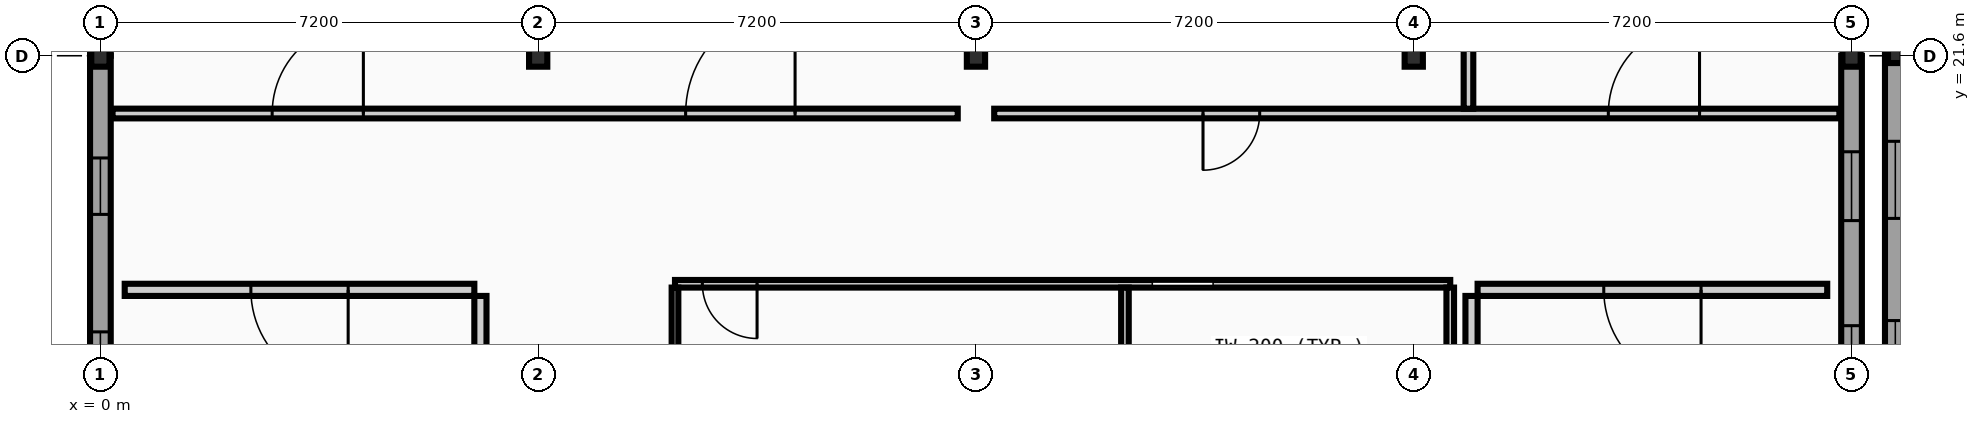
"""IFC4 building model, lengths in metres.
Left out: names, types, materials, properties, quantities, classifications, styles, units other than length and angle.
Written with IfcOpenShell. Run it as: python <this file> out.ifc"""

import sys

from ifc_helpers import new_model, si_unit, direction, frame, frame_2d, origin, origin_2d, place, context, subcontext, project, spatial, rectangle, i_section, extrude, element, fill, save


model = new_model("IFC4")
c1 = context("Model", 3, precision=1e-05, world=origin(), true_north=direction((0.0, 1.0)))
c2 = subcontext(c1, "Body", "Model", "MODEL_VIEW")
j1 = project(units=[si_unit("LENGTHUNIT", "METRE"), si_unit("PLANEANGLEUNIT", "RADIAN")], contexts=[c1])
p1 = place(None, origin())
s1 = spatial("IfcSite", under=j1, at=p1, CompositionType="ELEMENT")
p2 = place(p1, origin())
s2 = spatial("IfcBuilding", under=s1, at=p2, CompositionType="ELEMENT")
p3 = place(p2, frame((0.0, 0.0, 18.4)))
s3 = spatial("IfcBuildingStorey", under=s2, at=p3, CompositionType="ELEMENT", Elevation=18.4)
for number, where, z_axis, x_axis in (
    (1, (0.0, 21.6, 0.0), (0.0, 0.0, 1.0), (1.0, 0.0, 0.0)),
    (2, (7.2, 21.6, 0.0), (0.0, 0.0, 1.0), (1.0, 0.0, 0.0)),
    (3, (14.4, 21.6, 0.0), (0.0, 0.0, 1.0), (1.0, 0.0, 0.0)),
    (4, (21.6, 21.6, 0.0), (0.0, 0.0, 1.0), (1.0, 0.0, 0.0)),
    (5, (28.8, 21.6, 0.0), (0.0, 0.0, 1.0), (1.0, 0.0, 0.0)),
):
    element("IfcColumn", number, at=place(p3, frame(where, z_axis=z_axis, x_axis=x_axis)), inside=s3, PredefinedType="COLUMN", context=c2, shape_type="SweptSolid", body=[
        extrude(i_section(OverallWidth=0.3, OverallDepth=0.36, WebThickness=0.012, FlangeThickness=0.022, FilletRadius=0.027, at=origin_2d()), origin(), (0.0, 0.0, 1.0), 4.4),
    ])
p4 = place(p3, frame((29.52, 21.6, 0.0), z_axis=(0.0, 0.0, 1.0), x_axis=(1.0, 0.0, 0.0)))
e6 = element("IfcColumn", 6, at=p4, inside=s3, PredefinedType="COLUMN", context=c2, shape_type="SweptSolid", body=[
    extrude(i_section(OverallWidth=0.24, OverallDepth=0.24, WebThickness=0.01, FlangeThickness=0.017, FilletRadius=0.021, at=origin_2d()), origin(), (0.0, 0.0, 1.0), 4.4),
])
p5 = place(p3, frame((0.0, 21.6, 0.0), z_axis=(0.0, 0.0, 1.0), x_axis=(0.0, -1.0, 0.0)))
e7 = element("IfcWall", 7, at=p5, inside=s3, PredefinedType="STANDARD", context=c2, shape_type="SweptSolid", body=[
    extrude(rectangle(XDim=7.15, YDim=0.34, at=frame_2d((3.575, 0.0))), origin(), (0.0, 0.0, 1.0), 4.215),
])
p6 = place(p5, frame((1.681, 0.0, 0.95)))
e8 = element("IfcOpeningElement", 8, at=p6, cuts=e7, PredefinedType="OPENING", context=c2, shape_type="SweptSolid", body=[
    extrude(rectangle(XDim=0.928, YDim=1.404, at=frame_2d((0.464, 0.702))), frame((0.0, 0.18, 0.0), z_axis=(0.0, -1.0, 0.0), x_axis=(1.0, 0.0, 0.0)), (0.0, 0.0, 1.0), 0.36),
])
p7 = place(p5, frame((4.541, 0.0, 0.95)))
e9 = element("IfcOpeningElement", 9, at=p7, cuts=e7, PredefinedType="OPENING", context=c2, shape_type="SweptSolid", body=[
    extrude(rectangle(XDim=0.928, YDim=1.404, at=frame_2d((0.464, 0.702))), frame((0.0, 0.18, 0.0), z_axis=(0.0, -1.0, 0.0), x_axis=(1.0, 0.0, 0.0)), (0.0, 0.0, 1.0), 0.36),
])
p8 = place(p3, frame((0.0, 28.8, 0.0), z_axis=(0.0, 0.0, 1.0), x_axis=(0.0, -1.0, 0.0)))
e10 = element("IfcWall", 10, at=p8, inside=s3, PredefinedType="STANDARD", context=c2, shape_type="SweptSolid", body=[
    extrude(rectangle(XDim=7.2, YDim=0.34, at=frame_2d((3.6, 0.0))), origin(), (0.0, 0.0, 1.0), 3.9),
])
p9 = place(p8, frame((1.679, 0.0, 0.95)))
e11 = element("IfcOpeningElement", 11, at=p9, cuts=e10, PredefinedType="OPENING", context=c2, shape_type="SweptSolid", body=[
    extrude(rectangle(XDim=0.962, YDim=1.404, at=frame_2d((0.481, 0.702))), frame((0.0, 0.18, 0.0), z_axis=(0.0, -1.0, 0.0), x_axis=(1.0, 0.0, 0.0)), (0.0, 0.0, 1.0), 0.36),
])
p10 = place(p8, frame((4.559, 0.0, 0.95)))
e12 = element("IfcOpeningElement", 12, at=p10, cuts=e10, PredefinedType="OPENING", context=c2, shape_type="SweptSolid", body=[
    extrude(rectangle(XDim=0.962, YDim=1.404, at=frame_2d((0.481, 0.702))), frame((0.0, 0.18, 0.0), z_axis=(0.0, -1.0, 0.0), x_axis=(1.0, 0.0, 0.0)), (0.0, 0.0, 1.0), 0.36),
])
p11 = place(p3, frame((28.8, 14.45, 0.0), z_axis=(0.0, 0.0, 1.0), x_axis=(0.0, 1.0, 0.0)))
e13 = element("IfcWall", 13, at=p11, inside=s3, PredefinedType="STANDARD", context=c2, shape_type="SweptSolid", body=[
    extrude(rectangle(XDim=7.15, YDim=0.34, at=frame_2d((3.575, 0.0))), origin(), (0.0, 0.0, 1.0), 4.215),
])
p12 = place(p11, frame((1.579, 0.0, 0.95)))
e14 = element("IfcOpeningElement", 14, at=p12, cuts=e13, PredefinedType="OPENING", context=c2, shape_type="SweptSolid", body=[
    extrude(rectangle(XDim=1.132, YDim=1.404, at=frame_2d((0.566, 0.702))), frame((0.0, 0.18, 0.0), z_axis=(0.0, -1.0, 0.0), x_axis=(1.0, 0.0, 0.0)), (0.0, 0.0, 1.0), 0.36),
])
p13 = place(p11, frame((4.439, 0.0, 0.95)))
e15 = element("IfcOpeningElement", 15, at=p13, cuts=e13, PredefinedType="OPENING", context=c2, shape_type="SweptSolid", body=[
    extrude(rectangle(XDim=1.132, YDim=1.404, at=frame_2d((0.566, 0.702))), frame((0.0, 0.18, 0.0), z_axis=(0.0, -1.0, 0.0), x_axis=(1.0, 0.0, 0.0)), (0.0, 0.0, 1.0), 0.36),
])
p14 = place(p3, frame((29.52, 21.77, 0.0), z_axis=(0.0, 0.0, 1.0), x_axis=(0.0, -1.0, 0.0)))
e16 = element("IfcWall", 16, at=p14, inside=s3, PredefinedType="STANDARD", context=c2, shape_type="SweptSolid", body=[
    extrude(rectangle(XDim=7.37, YDim=0.34, at=frame_2d((3.685, 0.0))), origin(), (0.0, 0.0, 1.0), 4.11),
])
p15 = place(p14, frame((1.577, 0.0, 0.95)))
e17 = element("IfcOpeningElement", 17, at=p15, cuts=e16, PredefinedType="OPENING", context=c2, shape_type="SweptSolid", body=[
    extrude(rectangle(XDim=1.268, YDim=1.404, at=frame_2d((0.634, 0.702))), frame((0.0, 0.18, 0.0), z_axis=(0.0, -1.0, 0.0), x_axis=(1.0, 0.0, 0.0)), (0.0, 0.0, 1.0), 0.36),
])
p16 = place(p14, frame((4.525, 0.0, 0.95)))
e18 = element("IfcOpeningElement", 18, at=p16, cuts=e16, PredefinedType="OPENING", context=c2, shape_type="SweptSolid", body=[
    extrude(rectangle(XDim=1.268, YDim=1.404, at=frame_2d((0.634, 0.702))), frame((0.0, 0.18, 0.0), z_axis=(0.0, -1.0, 0.0), x_axis=(1.0, 0.0, 0.0)), (0.0, 0.0, 1.0), 0.36),
])
p17 = place(p3, frame((0.4, 17.75, 0.0), z_axis=(0.0, 0.0, 1.0), x_axis=(1.0, 0.0, 0.0)))
e19 = element("IfcWall", 19, at=p17, inside=s3, PredefinedType="PARTITIONING", context=c2, shape_type="SweptSolid", body=[
    extrude(rectangle(XDim=5.75, YDim=0.2, at=frame_2d((2.875, 0.0))), origin(), (0.0, 0.0, 1.0), 4.215),
])
p18 = place(p17, frame((2.075, 0.0, 0.0)))
e20 = element("IfcOpeningElement", 20, at=p18, cuts=e19, PredefinedType="OPENING", context=c2, shape_type="SweptSolid", body=[
    extrude(rectangle(XDim=1.6, YDim=2.2, at=frame_2d((0.8, 1.1))), frame((0.0, 0.11, 0.0), z_axis=(0.0, -1.0, 0.0), x_axis=(1.0, 0.0, 0.0)), (0.0, 0.0, 1.0), 0.22),
])
p19 = place(p3, frame((6.25, 14.45, 0.0), z_axis=(0.0, 0.0, 1.0), x_axis=(0.0, 1.0, 0.0)))
e21 = element("IfcWall", 21, at=p19, inside=s3, PredefinedType="PARTITIONING", context=c2, shape_type="SweptSolid", body=[
    extrude(rectangle(XDim=3.2, YDim=0.2, at=frame_2d((1.6, 0.0))), origin(), (0.0, 0.0, 1.0), 4.215),
])
p20 = place(p3, frame((22.65, 17.75, 0.0), z_axis=(0.0, 0.0, 1.0), x_axis=(1.0, 0.0, 0.0)))
e22 = element("IfcWall", 22, at=p20, inside=s3, PredefinedType="PARTITIONING", context=c2, shape_type="SweptSolid", body=[
    extrude(rectangle(XDim=5.75, YDim=0.2, at=frame_2d((2.875, 0.0))), origin(), (0.0, 0.0, 1.0), 4.215),
])
p21 = place(p20, frame((2.075, 0.0, 0.0)))
e23 = element("IfcOpeningElement", 23, at=p21, cuts=e22, PredefinedType="OPENING", context=c2, shape_type="SweptSolid", body=[
    extrude(rectangle(XDim=1.6, YDim=2.2, at=frame_2d((0.8, 1.1))), frame((0.0, 0.11, 0.0), z_axis=(0.0, -1.0, 0.0), x_axis=(1.0, 0.0, 0.0)), (0.0, 0.0, 1.0), 0.22),
])
p22 = place(p3, frame((22.55, 14.45, 0.0), z_axis=(0.0, 0.0, 1.0), x_axis=(0.0, 1.0, 0.0)))
e24 = element("IfcWall", 24, at=p22, inside=s3, PredefinedType="PARTITIONING", context=c2, shape_type="SweptSolid", body=[
    extrude(rectangle(XDim=3.2, YDim=0.2, at=frame_2d((1.6, 0.0))), origin(), (0.0, 0.0, 1.0), 4.215),
])
p23 = place(p3, frame((9.45, 17.85, 0.0), z_axis=(0.0, 0.0, 1.0), x_axis=(1.0, 0.0, 0.0)))
e25 = element("IfcWall", 25, at=p23, inside=s3, PredefinedType="PARTITIONING", context=c2, shape_type="SweptSolid", body=[
    extrude(rectangle(XDim=12.75, YDim=0.125, at=frame_2d((6.375, 0.0))), origin(), (0.0, 0.0, 1.0), 4.215),
])
p24 = place(p23, frame((7.85, 0.0, 0.0)))
e26 = element("IfcOpeningElement", 26, at=p24, cuts=e25, PredefinedType="OPENING", context=c2, shape_type="SweptSolid", body=[
    extrude(rectangle(XDim=1.0, YDim=2.1, at=frame_2d((0.5, 1.05))), frame((0.0, 0.073, 0.0), z_axis=(0.0, -1.0, 0.0), x_axis=(1.0, 0.0, 0.0)), (0.0, 0.0, 1.0), 0.145),
])
p25 = place(p23, frame((0.45, 0.0, 0.0)))
e27 = element("IfcOpeningElement", 27, at=p25, cuts=e25, PredefinedType="OPENING", context=c2, shape_type="SweptSolid", body=[
    extrude(rectangle(XDim=0.9, YDim=2.1, at=frame_2d((0.45, 1.05))), frame((0.0, 0.073, 0.0), z_axis=(0.0, -1.0, 0.0), x_axis=(1.0, 0.0, 0.0)), (0.0, 0.0, 1.0), 0.145),
])
p26 = place(p3, frame((0.2, 20.65, 0.0), z_axis=(0.0, 0.0, 1.0), x_axis=(1.0, 0.0, 0.0)))
e28 = element("IfcWall", 28, at=p26, inside=s3, PredefinedType="PARTITIONING", context=c2, shape_type="SweptSolid", body=[
    extrude(rectangle(XDim=13.9, YDim=0.16, at=frame_2d((6.95, 0.0))), origin(), (0.0, 0.0, 1.0), 4.215),
])
p27 = place(p26, frame((2.625, 0.0, 0.0)))
e29 = element("IfcOpeningElement", 29, at=p27, cuts=e28, PredefinedType="OPENING", context=c2, shape_type="SweptSolid", body=[
    extrude(rectangle(XDim=1.5, YDim=2.2, at=frame_2d((0.75, 1.1))), frame((0.0, 0.09, 0.0), z_axis=(0.0, -1.0, 0.0), x_axis=(1.0, 0.0, 0.0)), (0.0, 0.0, 1.0), 0.18),
])
p28 = place(p26, frame((9.425, 0.0, 0.0)))
e30 = element("IfcOpeningElement", 30, at=p28, cuts=e28, PredefinedType="OPENING", context=c2, shape_type="SweptSolid", body=[
    extrude(rectangle(XDim=1.8, YDim=2.3, at=frame_2d((0.9, 1.15))), frame((0.0, 0.09, 0.0), z_axis=(0.0, -1.0, 0.0), x_axis=(1.0, 0.0, 0.0)), (0.0, 0.0, 1.0), 0.18),
])
p29 = place(p3, frame((14.7, 20.65, 0.0), z_axis=(0.0, 0.0, 1.0), x_axis=(1.0, 0.0, 0.0)))
e31 = element("IfcWall", 31, at=p29, inside=s3, PredefinedType="PARTITIONING", context=c2, shape_type="SweptSolid", body=[
    extrude(rectangle(XDim=13.9, YDim=0.158, at=frame_2d((6.95, 0.0))), origin(), (0.0, 0.0, 1.0), 4.215),
])
p30 = place(p29, frame((10.1, 0.0, 0.0)))
e32 = element("IfcOpeningElement", 32, at=p30, cuts=e31, PredefinedType="OPENING", context=c2, shape_type="SweptSolid", body=[
    extrude(rectangle(XDim=1.5, YDim=2.2, at=frame_2d((0.75, 1.1))), frame((0.0, 0.089, 0.0), z_axis=(0.0, -1.0, 0.0), x_axis=(1.0, 0.0, 0.0)), (0.0, 0.0, 1.0), 0.178),
])
p31 = place(p29, frame((3.434, 0.0, 0.0)))
e33 = element("IfcOpeningElement", 33, at=p31, cuts=e31, PredefinedType="OPENING", context=c2, shape_type="SweptSolid", body=[
    extrude(rectangle(XDim=0.932, YDim=2.068, at=frame_2d((0.466, 1.034))), frame((0.0, 0.089, 0.0), z_axis=(0.0, -1.0, 0.0), x_axis=(1.0, 0.0, 0.0)), (0.0, 0.0, 1.0), 0.178),
])
p32 = place(p3, frame((9.45, 3.36, 0.0), z_axis=(0.0, 0.0, 1.0), x_axis=(0.0, 1.0, 0.0)))
e34 = element("IfcWall", 34, at=p32, inside=s3, PredefinedType="PARTITIONING", context=c2, shape_type="SweptSolid", body=[
    extrude(rectangle(XDim=14.427, YDim=0.11, at=frame_2d((7.214, 0.0))), origin(), (0.0, 0.0, 1.0), 3.96),
])
p33 = place(p3, frame((16.85, 0.2, 0.0), z_axis=(0.0, 0.0, 1.0), x_axis=(0.0, 1.0, 0.0)))
e35 = element("IfcWall", 35, at=p33, inside=s3, PredefinedType="PARTITIONING", context=c2, shape_type="SweptSolid", body=[
    extrude(rectangle(XDim=17.588, YDim=0.125, at=frame_2d((8.794, 0.0))), origin(), (0.0, 0.0, 1.0), 3.96),
])
p34 = place(p3, frame((22.2, 14.65, 0.0), z_axis=(0.0, 0.0, 1.0), x_axis=(0.0, 1.0, 0.0)))
e36 = element("IfcWall", 36, at=p34, inside=s3, PredefinedType="PARTITIONING", context=c2, shape_type="SweptSolid", body=[
    extrude(rectangle(XDim=3.138, YDim=0.125, at=frame_2d((1.569, 0.0))), origin(), (0.0, 0.0, 1.0), 4.215),
])
p35 = place(p3, frame((22.5, 20.729, 0.0), z_axis=(0.0, 0.0, 1.0), x_axis=(0.0, 1.0, 0.0)))
e37 = element("IfcWall", 37, at=p35, inside=s3, PredefinedType="PARTITIONING", context=c2, shape_type="SweptSolid", body=[
    extrude(rectangle(XDim=29.471, YDim=0.158, at=frame_2d((14.735, 0.0))), origin(), (0.0, 0.0, 1.0), 4.215),
])
p36 = place(p6, origin())
e38 = element("IfcWindow", 38, at=p36, inside=s3, PartitioningType="SINGLE_PANEL", PredefinedType="WINDOW", context=c2, shape_type="SweptSolid", body=[
    extrude(rectangle(XDim=0.928, YDim=1.404, at=frame_2d((0.464, 0.702))), frame((0.0, 0.03, 0.0), z_axis=(0.0, -1.0, 0.0), x_axis=(1.0, 0.0, 0.0)), (0.0, 0.0, 1.0), 0.06),
])
fill(e8, e38)
p37 = place(p7, origin())
e39 = element("IfcWindow", 39, at=p37, inside=s3, PartitioningType="SINGLE_PANEL", PredefinedType="WINDOW", context=c2, shape_type="SweptSolid", body=[
    extrude(rectangle(XDim=0.928, YDim=1.404, at=frame_2d((0.464, 0.702))), frame((0.0, 0.03, 0.0), z_axis=(0.0, -1.0, 0.0), x_axis=(1.0, 0.0, 0.0)), (0.0, 0.0, 1.0), 0.06),
])
fill(e9, e39)
p38 = place(p12, origin())
e40 = element("IfcWindow", 40, at=p38, inside=s3, PartitioningType="SINGLE_PANEL", PredefinedType="WINDOW", context=c2, shape_type="SweptSolid", body=[
    extrude(rectangle(XDim=1.132, YDim=1.404, at=frame_2d((0.566, 0.702))), frame((0.0, 0.03, 0.0), z_axis=(0.0, -1.0, 0.0), x_axis=(1.0, 0.0, 0.0)), (0.0, 0.0, 1.0), 0.06),
])
fill(e14, e40)
p39 = place(p13, origin())
e41 = element("IfcWindow", 41, at=p39, inside=s3, PartitioningType="SINGLE_PANEL", PredefinedType="WINDOW", context=c2, shape_type="SweptSolid", body=[
    extrude(rectangle(XDim=1.132, YDim=1.404, at=frame_2d((0.566, 0.702))), frame((0.0, 0.03, 0.0), z_axis=(0.0, -1.0, 0.0), x_axis=(1.0, 0.0, 0.0)), (0.0, 0.0, 1.0), 0.06),
])
fill(e15, e41)
p40 = place(p15, origin())
e42 = element("IfcWindow", 42, at=p40, inside=s3, PartitioningType="SINGLE_PANEL", PredefinedType="WINDOW", context=c2, shape_type="SweptSolid", body=[
    extrude(rectangle(XDim=1.268, YDim=1.404, at=frame_2d((0.634, 0.702))), frame((0.0, 0.03, 0.0), z_axis=(0.0, -1.0, 0.0), x_axis=(1.0, 0.0, 0.0)), (0.0, 0.0, 1.0), 0.06),
])
fill(e17, e42)
p41 = place(p16, origin())
e43 = element("IfcWindow", 43, at=p41, inside=s3, PartitioningType="SINGLE_PANEL", PredefinedType="WINDOW", context=c2, shape_type="SweptSolid", body=[
    extrude(rectangle(XDim=1.268, YDim=1.404, at=frame_2d((0.634, 0.702))), frame((0.0, 0.03, 0.0), z_axis=(0.0, -1.0, 0.0), x_axis=(1.0, 0.0, 0.0)), (0.0, 0.0, 1.0), 0.06),
])
fill(e18, e43)
p42 = place(p18, origin())
e44 = element("IfcDoor", 44, at=p42, inside=s3, OperationType="DOUBLE_DOOR_SINGLE_SWING", PredefinedType="DOOR", context=c2, shape_type="SweptSolid", body=[
    extrude(rectangle(XDim=1.6, YDim=2.2, at=frame_2d((0.8, 1.1))), frame((0.0, 0.025, 0.0), z_axis=(0.0, -1.0, 0.0), x_axis=(1.0, 0.0, 0.0)), (0.0, 0.0, 1.0), 0.05),
])
fill(e20, e44)
p43 = place(p21, origin())
e45 = element("IfcDoor", 45, at=p43, inside=s3, OperationType="DOUBLE_DOOR_SINGLE_SWING", PredefinedType="DOOR", context=c2, shape_type="SweptSolid", body=[
    extrude(rectangle(XDim=1.6, YDim=2.2, at=frame_2d((0.8, 1.1))), frame((0.0, 0.025, 0.0), z_axis=(0.0, -1.0, 0.0), x_axis=(1.0, 0.0, 0.0)), (0.0, 0.0, 1.0), 0.05),
])
fill(e23, e45)
p44 = place(p24, origin())
e46 = element("IfcDoor", 46, at=p44, inside=s3, OperationType="SLIDING_TO_LEFT", PredefinedType="DOOR", context=c2, shape_type="SweptSolid", body=[
    extrude(rectangle(XDim=1.0, YDim=2.1, at=frame_2d((0.5, 1.05))), frame((0.0, 0.025, 0.0), z_axis=(0.0, -1.0, 0.0), x_axis=(1.0, 0.0, 0.0)), (0.0, 0.0, 1.0), 0.05),
])
fill(e26, e46)
p45 = place(p25, origin())
e47 = element("IfcDoor", 47, at=p45, inside=s3, OperationType="SINGLE_SWING_RIGHT", PredefinedType="DOOR", context=c2, shape_type="SweptSolid", body=[
    extrude(rectangle(XDim=0.9, YDim=2.1, at=frame_2d((0.45, 1.05))), frame((0.0, 0.025, 0.0), z_axis=(0.0, -1.0, 0.0), x_axis=(1.0, 0.0, 0.0)), (0.0, 0.0, 1.0), 0.05),
])
fill(e27, e47)
p46 = place(p30, frame((1.5, 0.0, 0.0), z_axis=(0.0, 0.0, 1.0), x_axis=(-1.0, 0.0, 0.0)))
e48 = element("IfcDoor", 48, at=p46, inside=s3, OperationType="DOUBLE_DOOR_SINGLE_SWING", PredefinedType="DOOR", context=c2, shape_type="SweptSolid", body=[
    extrude(rectangle(XDim=1.5, YDim=2.2, at=frame_2d((0.75, 1.1))), frame((0.0, 0.025, 0.0), z_axis=(0.0, -1.0, 0.0), x_axis=(1.0, 0.0, 0.0)), (0.0, 0.0, 1.0), 0.05),
])
fill(e32, e48)
p47 = place(p27, frame((1.5, 0.0, 0.0), z_axis=(0.0, 0.0, 1.0), x_axis=(-1.0, 0.0, 0.0)))
e49 = element("IfcDoor", 49, at=p47, inside=s3, OperationType="DOUBLE_DOOR_SINGLE_SWING", PredefinedType="DOOR", context=c2, shape_type="SweptSolid", body=[
    extrude(rectangle(XDim=1.5, YDim=2.2, at=frame_2d((0.75, 1.1))), frame((0.0, 0.025, 0.0), z_axis=(0.0, -1.0, 0.0), x_axis=(1.0, 0.0, 0.0)), (0.0, 0.0, 1.0), 0.05),
])
fill(e29, e49)
p48 = place(p28, frame((1.8, 0.0, 0.0), z_axis=(0.0, 0.0, 1.0), x_axis=(-1.0, 0.0, 0.0)))
e50 = element("IfcDoor", 50, at=p48, inside=s3, OperationType="DOUBLE_DOOR_SINGLE_SWING", PredefinedType="DOOR", context=c2, shape_type="SweptSolid", body=[
    extrude(rectangle(XDim=1.8, YDim=2.3, at=frame_2d((0.9, 1.15))), frame((0.0, 0.025, 0.0), z_axis=(0.0, -1.0, 0.0), x_axis=(1.0, 0.0, 0.0)), (0.0, 0.0, 1.0), 0.05),
])
fill(e30, e50)
p49 = place(p31, frame((0.932, 0.0, 0.0), z_axis=(0.0, 0.0, 1.0), x_axis=(-1.0, 0.0, 0.0)))
e51 = element("IfcDoor", 51, at=p49, inside=s3, OperationType="SINGLE_SWING_LEFT", PredefinedType="DOOR", context=c2, shape_type="SweptSolid", body=[
    extrude(rectangle(XDim=0.932, YDim=2.068, at=frame_2d((0.466, 1.034))), frame((0.0, 0.025, 0.0), z_axis=(0.0, -1.0, 0.0), x_axis=(1.0, 0.0, 0.0)), (0.0, 0.0, 1.0), 0.05),
])
fill(e33, e51)
save(model, sys.argv[1])
